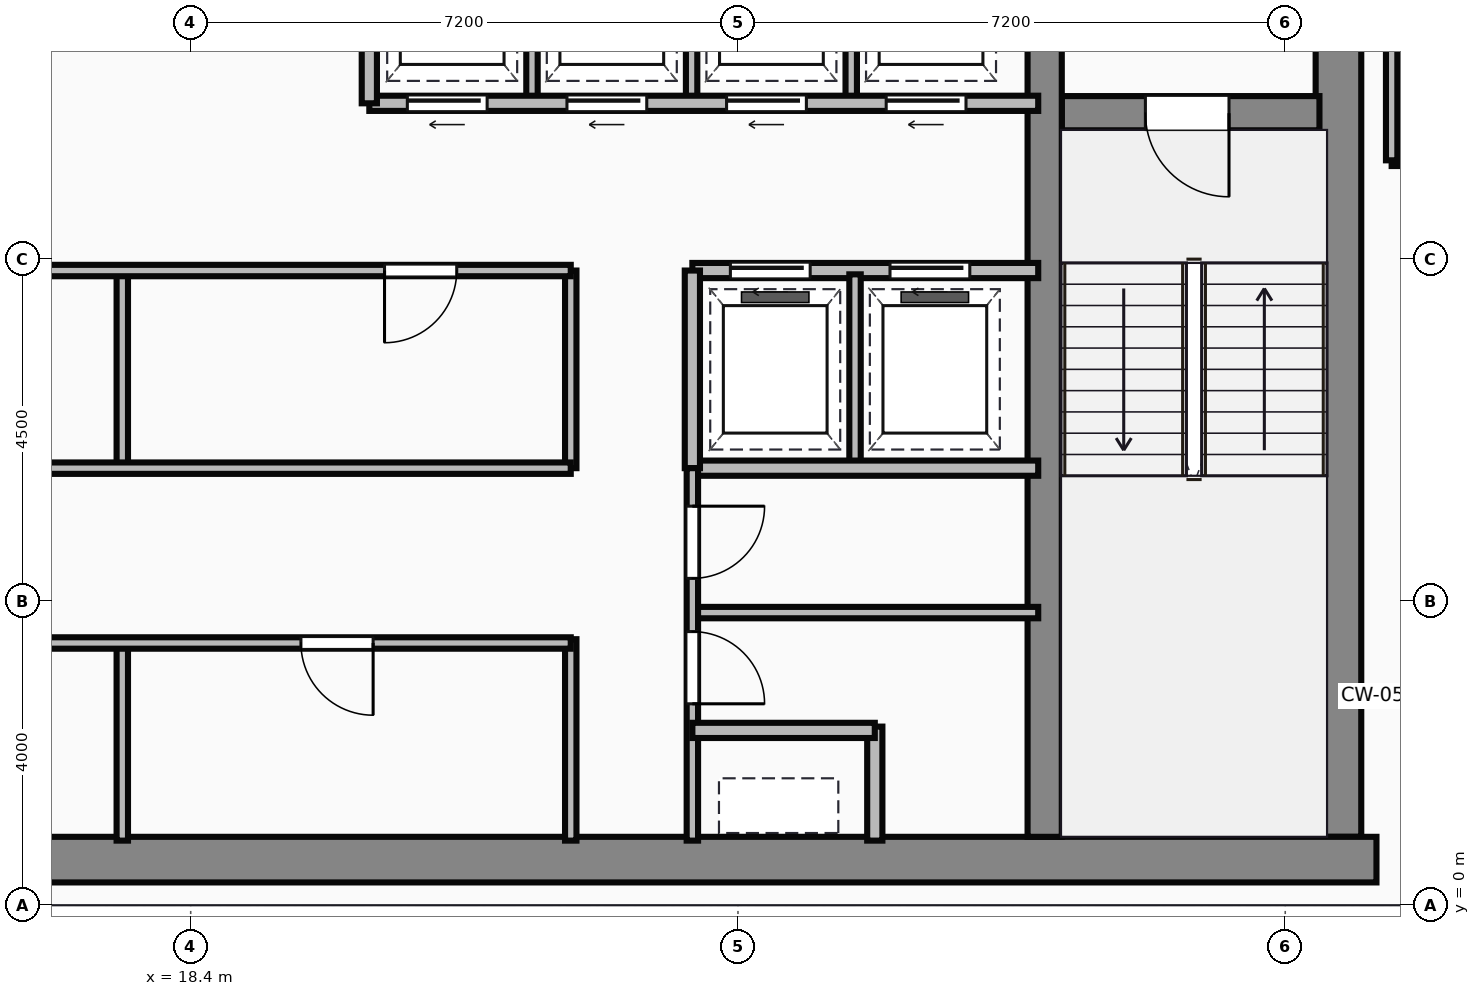
"""IFC4 building model, lengths in metres.
Left out: names, types, materials, properties, quantities, classifications, styles, units other than length and angle.
Written with IfcOpenShell. Run it as: python <this file> out.ifc"""

import sys

from ifc_helpers import new_model, si_unit, direction, frame, frame_2d, origin, place, context, subcontext, project, spatial, rectangle, extrude, source, transform, mapped, element, fill, save


model = new_model("IFC4")
c1 = context("Model", 3, precision=1e-05, world=origin(), true_north=direction((0.0, 1.0)))
c2 = subcontext(c1, "Body", "Model", "MODEL_VIEW")
j1 = project(units=[si_unit("LENGTHUNIT", "METRE"), si_unit("PLANEANGLEUNIT", "RADIAN")], contexts=[c1])
p1 = place(None, origin())
s1 = spatial("IfcSite", under=j1, at=p1, CompositionType="ELEMENT")
p2 = place(p1, origin())
s2 = spatial("IfcBuilding", under=s1, at=p2, CompositionType="ELEMENT")
p3 = place(p2, frame((0.0, 0.0, 232.4)))
s3 = spatial("IfcBuildingStorey", under=s2, at=p3, CompositionType="ELEMENT", Elevation=232.4)
m1 = source(origin(), c2, "Body", "SweptSolid", [
    extrude(rectangle(XDim=29.5, YDim=0.6, at=frame_2d((14.75, 0.0))), origin(), (0.0, 0.0, 1.0), 3.65),
])
p4 = place(p3, frame((4.5, 0.6, 0.0), z_axis=(0.0, 0.0, 1.0), x_axis=(1.0, 0.0, 0.0)))
e1 = element("IfcWall", 1, at=p4, inside=s3, PredefinedType="SHEAR", context=c2, shape_type="MappedRepresentation", body=[
    mapped(m1, transform((0.0, 0.0, 0.0))),
])
m2 = source(origin(), c2, "Body", "SweptSolid", [
    extrude(rectangle(XDim=13.1, YDim=0.6, at=frame_2d((6.55, 0.0))), origin(), (0.0, 0.0, 1.0), 3.65),
])
p5 = place(p3, frame((33.5, 0.9, 0.0), z_axis=(0.0, 0.0, 1.0), x_axis=(0.0, 1.0, 0.0)))
e2 = element("IfcWall", 2, at=p5, inside=s3, PredefinedType="SHEAR", context=c2, shape_type="MappedRepresentation", body=[
    mapped(m2, transform((0.0, 0.0, 0.0))),
])
m3 = source(origin(), c2, "Body", "SweptSolid", [
    extrude(rectangle(XDim=12.5, YDim=0.45, at=frame_2d((6.25, 0.0))), origin(), (0.0, 0.0, 1.0), 3.65),
])
p6 = place(p3, frame((29.635, 0.9, 0.0), z_axis=(0.0, 0.0, 1.0), x_axis=(0.0, 1.0, 0.0)))
e3 = element("IfcWall", 3, at=p6, inside=s3, PredefinedType="SHEAR", context=c2, shape_type="MappedRepresentation", body=[
    mapped(m3, transform((0.0, 0.0, 0.0))),
])
m4 = source(origin(), c2, "Body", "SweptSolid", [
    extrude(rectangle(XDim=3.39, YDim=0.45, at=frame_2d((1.695, 0.0))), origin(), (0.0, 0.0, 1.0), 3.65),
])
p7 = place(p3, frame((29.86, 10.42, 0.0), z_axis=(0.0, 0.0, 1.0), x_axis=(1.0, 0.0, 0.0)))
e4 = element("IfcWall", 4, at=p7, inside=s3, PredefinedType="SHEAR", context=c2, shape_type="MappedRepresentation", body=[
    mapped(m4, transform((0.0, 0.0, 0.0))),
])
p8 = place(p7, frame((1.1, 0.0, 0.0)))
e5 = element("IfcOpeningElement", 5, at=p8, cuts=e4, PredefinedType="OPENING", context=c2, shape_type="SweptSolid", body=[
    extrude(rectangle(XDim=1.1, YDim=2.15, at=frame_2d((0.55, 1.075))), frame((0.0, 0.235, 0.0), z_axis=(0.0, -1.0, 0.0), x_axis=(1.0, 0.0, 0.0)), (0.0, 0.0, 1.0), 0.47),
])
m5 = source(origin(), c2, "Body", "SweptSolid", [
    extrude(rectangle(XDim=10.35, YDim=0.15, at=frame_2d((5.175, 0.0))), origin(), (0.0, 0.0, 1.0), 3.35),
])
p9 = place(p3, frame((13.05, 3.45, 0.0), z_axis=(0.0, 0.0, 1.0), x_axis=(1.0, 0.0, 0.0)))
e6 = element("IfcWall", 6, at=p9, inside=s3, PredefinedType="PARTITIONING", context=c2, shape_type="MappedRepresentation", body=[
    mapped(m5, transform((0.0, 0.0, 0.0))),
])
p10 = place(p9, frame((2.1, 0.0, 0.0)))
e7 = element("IfcOpeningElement", 7, at=p10, cuts=e6, PredefinedType="OPENING", context=c2, shape_type="SweptSolid", body=[
    extrude(rectangle(XDim=0.95, YDim=2.15, at=frame_2d((0.475, 1.075))), frame((0.0, 0.085, 0.0), z_axis=(0.0, -1.0, 0.0), x_axis=(1.0, 0.0, 0.0)), (0.0, 0.0, 1.0), 0.17),
])
p11 = place(p9, frame((6.8, 0.0, 0.0)))
e8 = element("IfcOpeningElement", 8, at=p11, cuts=e6, PredefinedType="OPENING", context=c2, shape_type="SweptSolid", body=[
    extrude(rectangle(XDim=0.95, YDim=2.15, at=frame_2d((0.475, 1.075))), frame((0.0, 0.085, 0.0), z_axis=(0.0, -1.0, 0.0), x_axis=(1.0, 0.0, 0.0)), (0.0, 0.0, 1.0), 0.17),
])
m6 = source(origin(), c2, "Body", "SweptSolid", [
    extrude(rectangle(XDim=2.65, YDim=0.15, at=frame_2d((1.325, 0.0))), origin(), (0.0, 0.0, 1.0), 3.35),
])
p12 = place(p3, frame((23.4, 0.85, 0.0), z_axis=(0.0, 0.0, 1.0), x_axis=(0.0, 1.0, 0.0)))
e9 = element("IfcWall", 9, at=p12, inside=s3, PredefinedType="PARTITIONING", context=c2, shape_type="MappedRepresentation", body=[
    mapped(m6, transform((0.0, 0.0, 0.0))),
])
m7 = source(origin(), c2, "Body", "SweptSolid", [
    extrude(rectangle(XDim=2.6, YDim=0.15, at=frame_2d((1.3, 0.0))), origin(), (0.0, 0.0, 1.0), 3.35),
])
p13 = place(p3, frame((17.5, 0.85, 0.0), z_axis=(0.0, 0.0, 1.0), x_axis=(0.0, 1.0, 0.0)))
e10 = element("IfcWall", 10, at=p13, inside=s3, PredefinedType="PARTITIONING", context=c2, shape_type="MappedRepresentation", body=[
    mapped(m7, transform((0.0, 0.0, 0.0))),
])
m8 = source(origin(), c2, "Body", "SweptSolid", [
    extrude(rectangle(XDim=11.85, YDim=0.15, at=frame_2d((5.925, 0.0))), origin(), (0.0, 0.0, 1.0), 3.35),
])
p14 = place(p3, frame((11.55, 5.75, 0.0), z_axis=(0.0, 0.0, 1.0), x_axis=(1.0, 0.0, 0.0)))
e11 = element("IfcWall", 11, at=p14, inside=s3, PredefinedType="PARTITIONING", context=c2, shape_type="MappedRepresentation", body=[
    mapped(m8, transform((0.0, 0.0, 0.0))),
])
p15 = place(p3, frame((11.55, 8.35, 0.0), z_axis=(0.0, 0.0, 1.0), x_axis=(1.0, 0.0, 0.0)))
e12 = element("IfcWall", 12, at=p15, inside=s3, PredefinedType="PARTITIONING", context=c2, shape_type="MappedRepresentation", body=[
    mapped(m8, transform((0.0, 0.0, 0.0))),
])
p16 = place(p15, frame((1.1, 0.0, 0.0)))
e13 = element("IfcOpeningElement", 13, at=p16, cuts=e12, PredefinedType="OPENING", context=c2, shape_type="SweptSolid", body=[
    extrude(rectangle(XDim=0.95, YDim=2.15, at=frame_2d((0.475, 1.075))), frame((0.0, 0.085, 0.0), z_axis=(0.0, -1.0, 0.0), x_axis=(1.0, 0.0, 0.0)), (0.0, 0.0, 1.0), 0.17),
])
p17 = place(p15, frame((9.4, 0.0, 0.0)))
e14 = element("IfcOpeningElement", 14, at=p17, cuts=e12, PredefinedType="OPENING", context=c2, shape_type="SweptSolid", body=[
    extrude(rectangle(XDim=0.95, YDim=2.15, at=frame_2d((0.475, 1.075))), frame((0.0, 0.085, 0.0), z_axis=(0.0, -1.0, 0.0), x_axis=(1.0, 0.0, 0.0)), (0.0, 0.0, 1.0), 0.17),
])
m9 = source(origin(), c2, "Body", "SweptSolid", [
    extrude(rectangle(XDim=2.6, YDim=0.15, at=frame_2d((1.3, 0.0))), origin(), (0.0, 0.0, 1.0), 3.35),
])
p18 = place(p3, frame((23.4, 5.75, 0.0), z_axis=(0.0, 0.0, 1.0), x_axis=(0.0, 1.0, 0.0)))
e15 = element("IfcWall", 15, at=p18, inside=s3, PredefinedType="PARTITIONING", context=c2, shape_type="MappedRepresentation", body=[
    mapped(m9, transform((0.0, 0.0, 0.0))),
])
m10 = source(origin(), c2, "Body", "SweptSolid", [
    extrude(rectangle(XDim=2.5, YDim=0.15, at=frame_2d((1.25, 0.0))), origin(), (0.0, 0.0, 1.0), 3.35),
])
p19 = place(p3, frame((17.5, 5.8, 0.0), z_axis=(0.0, 0.0, 1.0), x_axis=(0.0, 1.0, 0.0)))
e16 = element("IfcWall", 16, at=p19, inside=s3, PredefinedType="PARTITIONING", context=c2, shape_type="MappedRepresentation", body=[
    mapped(m10, transform((0.0, 0.0, 0.0))),
])
m11 = source(origin(), c2, "Body", "SweptSolid", [
    extrude(rectangle(XDim=8.8, YDim=0.2, at=frame_2d((4.4, 0.0))), origin(), (0.0, 0.0, 1.0), 3.35),
])
p20 = place(p3, frame((20.75, 10.55, 0.0), z_axis=(0.0, 0.0, 1.0), x_axis=(1.0, 0.0, 0.0)))
e17 = element("IfcWall", 17, at=p20, inside=s3, PredefinedType="PARTITIONING", context=c2, shape_type="MappedRepresentation", body=[
    mapped(m11, transform((0.0, 0.0, 0.0))),
])
p21 = place(p20, frame((0.5, 0.0, 0.0)))
e18 = element("IfcOpeningElement", 18, at=p21, cuts=e17, PredefinedType="OPENING", context=c2, shape_type="SweptSolid", body=[
    extrude(rectangle(XDim=1.05, YDim=2.15, at=frame_2d((0.525, 1.075))), frame((0.0, 0.11, 0.0), z_axis=(0.0, -1.0, 0.0), x_axis=(1.0, 0.0, 0.0)), (0.0, 0.0, 1.0), 0.22),
])
p22 = place(p20, frame((2.6, 0.0, 0.0)))
e19 = element("IfcOpeningElement", 19, at=p22, cuts=e17, PredefinedType="OPENING", context=c2, shape_type="SweptSolid", body=[
    extrude(rectangle(XDim=1.05, YDim=2.15, at=frame_2d((0.525, 1.075))), frame((0.0, 0.11, 0.0), z_axis=(0.0, -1.0, 0.0), x_axis=(1.0, 0.0, 0.0)), (0.0, 0.0, 1.0), 0.22),
])
p23 = place(p20, frame((4.7, 0.0, 0.0)))
e20 = element("IfcOpeningElement", 20, at=p23, cuts=e17, PredefinedType="OPENING", context=c2, shape_type="SweptSolid", body=[
    extrude(rectangle(XDim=1.05, YDim=2.15, at=frame_2d((0.525, 1.075))), frame((0.0, 0.11, 0.0), z_axis=(0.0, -1.0, 0.0), x_axis=(1.0, 0.0, 0.0)), (0.0, 0.0, 1.0), 0.22),
])
p24 = place(p20, frame((6.8, 0.0, 0.0)))
e21 = element("IfcOpeningElement", 21, at=p24, cuts=e17, PredefinedType="OPENING", context=c2, shape_type="SweptSolid", body=[
    extrude(rectangle(XDim=1.05, YDim=2.15, at=frame_2d((0.525, 1.075))), frame((0.0, 0.11, 0.0), z_axis=(0.0, -1.0, 0.0), x_axis=(1.0, 0.0, 0.0)), (0.0, 0.0, 1.0), 0.22),
])
m12 = source(origin(), c2, "Body", "SweptSolid", [
    extrude(rectangle(XDim=3.0, YDim=0.2, at=frame_2d((1.5, 0.0))), origin(), (0.0, 0.0, 1.0), 3.35),
])
p25 = place(p3, frame((20.75, 10.55, 0.0), z_axis=(0.0, 0.0, 1.0), x_axis=(0.0, 1.0, 0.0)))
e22 = element("IfcWall", 22, at=p25, inside=s3, PredefinedType="PARTITIONING", context=c2, shape_type="MappedRepresentation", body=[
    mapped(m12, transform((0.0, 0.0, 0.0))),
])
m13 = source(origin(), c2, "Body", "SweptSolid", [
    extrude(rectangle(XDim=2.85, YDim=0.15, at=frame_2d((1.425, 0.0))), origin(), (0.0, 0.0, 1.0), 3.35),
])
for number, where, z_axis, x_axis in (
    (23, (22.89, 10.6, 0.0), (0.0, 0.0, 1.0), (0.0, 1.0, 0.0)),
    (24, (24.99, 10.6, 0.0), (0.0, 0.0, 1.0), (0.0, 1.0, 0.0)),
    (25, (27.09, 10.6, 0.0), (0.0, 0.0, 1.0), (0.0, 1.0, 0.0)),
):
    element("IfcWall", number, at=place(p3, frame(where, z_axis=z_axis, x_axis=x_axis)), inside=s3, PredefinedType="PARTITIONING", context=c2, shape_type="MappedRepresentation", body=[
        mapped(m13, transform((0.0, 0.0, 0.0))),
    ])
m14 = source(origin(), c2, "Body", "SweptSolid", [
    extrude(rectangle(XDim=4.55, YDim=0.2, at=frame_2d((2.275, 0.0))), origin(), (0.0, 0.0, 1.0), 3.35),
])
p26 = place(p3, frame((25.0, 8.35, 0.0), z_axis=(0.0, 0.0, 1.0), x_axis=(1.0, 0.0, 0.0)))
e26 = element("IfcWall", 26, at=p26, inside=s3, PredefinedType="PARTITIONING", context=c2, shape_type="MappedRepresentation", body=[
    mapped(m14, transform((0.0, 0.0, 0.0))),
])
p27 = place(p26, frame((0.5, 0.0, 0.0)))
e27 = element("IfcOpeningElement", 27, at=p27, cuts=e26, PredefinedType="OPENING", context=c2, shape_type="SweptSolid", body=[
    extrude(rectangle(XDim=1.05, YDim=2.15, at=frame_2d((0.525, 1.075))), frame((0.0, 0.11, 0.0), z_axis=(0.0, -1.0, 0.0), x_axis=(1.0, 0.0, 0.0)), (0.0, 0.0, 1.0), 0.22),
])
p28 = place(p26, frame((2.6, 0.0, 0.0)))
e28 = element("IfcOpeningElement", 28, at=p28, cuts=e26, PredefinedType="OPENING", context=c2, shape_type="SweptSolid", body=[
    extrude(rectangle(XDim=1.05, YDim=2.15, at=frame_2d((0.525, 1.075))), frame((0.0, 0.11, 0.0), z_axis=(0.0, -1.0, 0.0), x_axis=(1.0, 0.0, 0.0)), (0.0, 0.0, 1.0), 0.22),
])
p29 = place(p3, frame((25.0, 5.75, 0.0), z_axis=(0.0, 0.0, 1.0), x_axis=(1.0, 0.0, 0.0)))
e29 = element("IfcWall", 29, at=p29, inside=s3, PredefinedType="PARTITIONING", context=c2, shape_type="MappedRepresentation", body=[
    mapped(m14, transform((0.0, 0.0, 0.0))),
])
m15 = source(origin(), c2, "Body", "SweptSolid", [
    extrude(rectangle(XDim=2.6, YDim=0.2, at=frame_2d((1.3, 0.0))), origin(), (0.0, 0.0, 1.0), 3.35),
])
p30 = place(p3, frame((25.0, 5.75, 0.0), z_axis=(0.0, 0.0, 1.0), x_axis=(0.0, 1.0, 0.0)))
e30 = element("IfcWall", 30, at=p30, inside=s3, PredefinedType="PARTITIONING", context=c2, shape_type="MappedRepresentation", body=[
    mapped(m15, transform((0.0, 0.0, 0.0))),
])
p31 = place(p3, frame((27.14, 5.8, 0.0), z_axis=(0.0, 0.0, 1.0), x_axis=(0.0, 1.0, 0.0)))
e31 = element("IfcWall", 31, at=p31, inside=s3, PredefinedType="PARTITIONING", context=c2, shape_type="MappedRepresentation", body=[
    mapped(m10, transform((0.0, 0.0, 0.0))),
])
m16 = source(origin(), c2, "Body", "SweptSolid", [
    extrude(rectangle(XDim=4.9, YDim=0.15, at=frame_2d((2.45, 0.0))), origin(), (0.0, 0.0, 1.0), 3.35),
])
p32 = place(p3, frame((25.0, 0.85, 0.0), z_axis=(0.0, 0.0, 1.0), x_axis=(0.0, 1.0, 0.0)))
e32 = element("IfcWall", 32, at=p32, inside=s3, PredefinedType="PARTITIONING", context=c2, shape_type="MappedRepresentation", body=[
    mapped(m16, transform((0.0, 0.0, 0.0))),
])
p33 = place(p32, frame((1.8, 0.0, 0.0)))
e33 = element("IfcOpeningElement", 33, at=p33, cuts=e32, PredefinedType="OPENING", context=c2, shape_type="SweptSolid", body=[
    extrude(rectangle(XDim=0.95, YDim=2.15, at=frame_2d((0.475, 1.075))), frame((0.0, 0.085, 0.0), z_axis=(0.0, -1.0, 0.0), x_axis=(1.0, 0.0, 0.0)), (0.0, 0.0, 1.0), 0.17),
])
p34 = place(p32, frame((3.45, 0.0, 0.0)))
e34 = element("IfcOpeningElement", 34, at=p34, cuts=e32, PredefinedType="OPENING", context=c2, shape_type="SweptSolid", body=[
    extrude(rectangle(XDim=0.95, YDim=2.15, at=frame_2d((0.475, 1.075))), frame((0.0, 0.085, 0.0), z_axis=(0.0, -1.0, 0.0), x_axis=(1.0, 0.0, 0.0)), (0.0, 0.0, 1.0), 0.17),
])
m17 = source(origin(), c2, "Body", "SweptSolid", [
    extrude(rectangle(XDim=2.4, YDim=0.2, at=frame_2d((1.2, 0.0))), origin(), (0.0, 0.0, 1.0), 3.35),
])
p35 = place(p3, frame((25.0, 2.3, 0.0), z_axis=(0.0, 0.0, 1.0), x_axis=(1.0, 0.0, 0.0)))
e35 = element("IfcWall", 35, at=p35, inside=s3, PredefinedType="PARTITIONING", context=c2, shape_type="MappedRepresentation", body=[
    mapped(m17, transform((0.0, 0.0, 0.0))),
])
m18 = source(origin(), c2, "Body", "SweptSolid", [
    extrude(rectangle(XDim=1.5, YDim=0.2, at=frame_2d((0.75, 0.0))), origin(), (0.0, 0.0, 1.0), 3.35),
])
p36 = place(p3, frame((27.4, 0.85, 0.0), z_axis=(0.0, 0.0, 1.0), x_axis=(0.0, 1.0, 0.0)))
e36 = element("IfcWall", 36, at=p36, inside=s3, PredefinedType="PARTITIONING", context=c2, shape_type="MappedRepresentation", body=[
    mapped(m18, transform((0.0, 0.0, 0.0))),
])
m19 = source(origin(), c2, "Body", "SweptSolid", [
    extrude(rectangle(XDim=4.55, YDim=0.15, at=frame_2d((2.275, 0.0))), origin(), (0.0, 0.0, 1.0), 3.35),
])
p37 = place(p3, frame((25.0, 3.85, 0.0), z_axis=(0.0, 0.0, 1.0), x_axis=(1.0, 0.0, 0.0)))
e37 = element("IfcWall", 37, at=p37, inside=s3, PredefinedType="PARTITIONING", context=c2, shape_type="MappedRepresentation", body=[
    mapped(m19, transform((0.0, 0.0, 0.0))),
])
m20 = source(origin(), c2, "Body", "SweptSolid", [
    extrude(rectangle(XDim=4.8, YDim=0.15, at=frame_2d((2.4, 0.0))), origin(), (0.0, 0.0, 1.0), 3.35),
])
p38 = place(p3, frame((34.2, 9.8, 0.0), z_axis=(0.0, 0.0, 1.0), x_axis=(1.0, 0.0, 0.0)))
e38 = element("IfcWall", 38, at=p38, inside=s3, PredefinedType="PARTITIONING", context=c2, shape_type="MappedRepresentation", body=[
    mapped(m20, transform((0.0, 0.0, 0.0))),
])
m21 = source(origin(), c2, "Body", "SweptSolid", [
    extrude(rectangle(XDim=4.18, YDim=0.15, at=frame_2d((2.09, 0.0))), origin(), (0.0, 0.0, 1.0), 3.35),
])
p39 = place(p3, frame((34.2, 9.8, 0.0), z_axis=(0.0, 0.0, 1.0), x_axis=(0.0, 1.0, 0.0)))
e39 = element("IfcWall", 39, at=p39, inside=s3, PredefinedType="PARTITIONING", context=c2, shape_type="MappedRepresentation", body=[
    mapped(m21, transform((0.0, 0.0, 0.0))),
])
m22 = source(origin(), c2, "Body", "SweptSolid", [
    extrude(rectangle(XDim=1.1, YDim=2.15, at=frame_2d((0.55, 1.075))), frame((0.0, 0.025, 0.0), z_axis=(0.0, -1.0, 0.0), x_axis=(1.0, 0.0, 0.0)), (0.0, 0.0, 1.0), 0.05),
])
p40 = place(p8, frame((1.1, 0.0, 0.0), z_axis=(0.0, 0.0, 1.0), x_axis=(-1.0, 0.0, 0.0)))
e40 = element("IfcDoor", 40, at=p40, inside=s3, OperationType="SINGLE_SWING_RIGHT", PredefinedType="DOOR", context=c2, shape_type="MappedRepresentation", body=[
    mapped(m22, transform((0.0, 0.0, 0.0))),
])
fill(e5, e40)
m23 = source(origin(), c2, "Body", "SweptSolid", [
    extrude(rectangle(XDim=0.95, YDim=2.15, at=frame_2d((0.475, 1.075))), frame((0.0, 0.025, 0.0), z_axis=(0.0, -1.0, 0.0), x_axis=(1.0, 0.0, 0.0)), (0.0, 0.0, 1.0), 0.05),
])
p41 = place(p11, origin())
e41 = element("IfcDoor", 41, at=p41, inside=s3, OperationType="SINGLE_SWING_RIGHT", PredefinedType="DOOR", context=c2, shape_type="MappedRepresentation", body=[
    mapped(m23, transform((0.0, 0.0, 0.0))),
])
fill(e8, e41)
p42 = place(p17, origin())
e42 = element("IfcDoor", 42, at=p42, inside=s3, OperationType="SINGLE_SWING_LEFT", PredefinedType="DOOR", context=c2, shape_type="MappedRepresentation", body=[
    mapped(m23, transform((0.0, 0.0, 0.0))),
])
fill(e14, e42)
m24 = source(origin(), c2, "Body", "SweptSolid", [
    extrude(rectangle(XDim=1.05, YDim=2.15, at=frame_2d((0.525, 1.075))), frame((0.0, 0.025, 0.0), z_axis=(0.0, -1.0, 0.0), x_axis=(1.0, 0.0, 0.0)), (0.0, 0.0, 1.0), 0.05),
])
p43 = place(p21, frame((1.05, 0.0, 0.0), z_axis=(0.0, 0.0, 1.0), x_axis=(-1.0, 0.0, 0.0)))
e43 = element("IfcDoor", 43, at=p43, inside=s3, OperationType="SLIDING_TO_LEFT", PredefinedType="DOOR", context=c2, shape_type="MappedRepresentation", body=[
    mapped(m24, transform((0.0, 0.0, 0.0))),
])
fill(e18, e43)
p44 = place(p22, frame((1.05, 0.0, 0.0), z_axis=(0.0, 0.0, 1.0), x_axis=(-1.0, 0.0, 0.0)))
e44 = element("IfcDoor", 44, at=p44, inside=s3, OperationType="SLIDING_TO_LEFT", PredefinedType="DOOR", context=c2, shape_type="MappedRepresentation", body=[
    mapped(m24, transform((0.0, 0.0, 0.0))),
])
fill(e19, e44)
p45 = place(p23, frame((1.05, 0.0, 0.0), z_axis=(0.0, 0.0, 1.0), x_axis=(-1.0, 0.0, 0.0)))
e45 = element("IfcDoor", 45, at=p45, inside=s3, OperationType="SLIDING_TO_LEFT", PredefinedType="DOOR", context=c2, shape_type="MappedRepresentation", body=[
    mapped(m24, transform((0.0, 0.0, 0.0))),
])
fill(e20, e45)
p46 = place(p24, frame((1.05, 0.0, 0.0), z_axis=(0.0, 0.0, 1.0), x_axis=(-1.0, 0.0, 0.0)))
e46 = element("IfcDoor", 46, at=p46, inside=s3, OperationType="SLIDING_TO_LEFT", PredefinedType="DOOR", context=c2, shape_type="MappedRepresentation", body=[
    mapped(m24, transform((0.0, 0.0, 0.0))),
])
fill(e21, e46)
p47 = place(p27, origin())
e47 = element("IfcDoor", 47, at=p47, inside=s3, OperationType="SLIDING_TO_LEFT", PredefinedType="DOOR", context=c2, shape_type="MappedRepresentation", body=[
    mapped(m24, transform((0.0, 0.0, 0.0))),
])
fill(e27, e47)
p48 = place(p28, origin())
e48 = element("IfcDoor", 48, at=p48, inside=s3, OperationType="SLIDING_TO_LEFT", PredefinedType="DOOR", context=c2, shape_type="MappedRepresentation", body=[
    mapped(m24, transform((0.0, 0.0, 0.0))),
])
fill(e28, e48)
p49 = place(p33, origin())
e49 = element("IfcDoor", 49, at=p49, inside=s3, OperationType="SINGLE_SWING_LEFT", PredefinedType="DOOR", context=c2, shape_type="MappedRepresentation", body=[
    mapped(m23, transform((0.0, 0.0, 0.0))),
])
fill(e33, e49)
p50 = place(p34, origin())
e50 = element("IfcDoor", 50, at=p50, inside=s3, OperationType="SINGLE_SWING_RIGHT", PredefinedType="DOOR", context=c2, shape_type="MappedRepresentation", body=[
    mapped(m23, transform((0.0, 0.0, 0.0))),
])
fill(e34, e50)
save(model, sys.argv[1])
